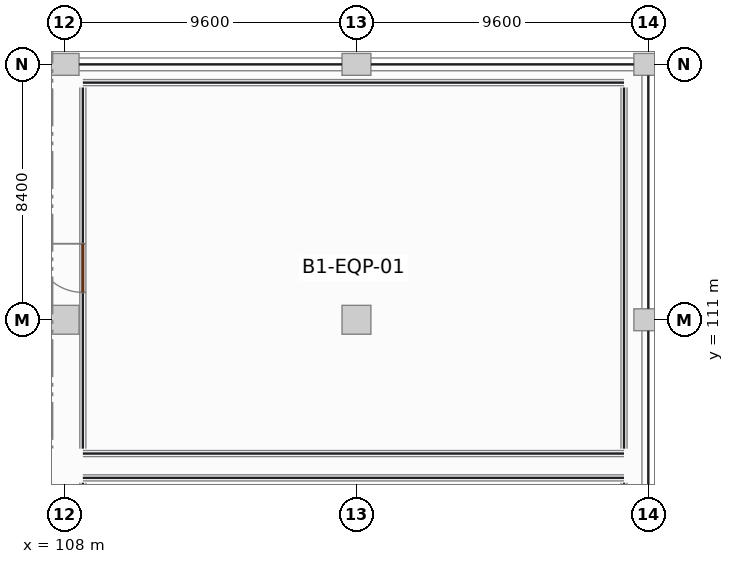
"""IFC4 building model, lengths in metres.
Left out: names, types, materials, properties, quantities, classifications, styles, units other than length and angle.
Written with IfcOpenShell. Run it as: python <this file> out.ifc"""

import sys

from ifc_helpers import new_model, si_unit, direction, frame, frame_2d, origin, origin_2d, place, context, subcontext, project, spatial, rectangle, extrude, element, fill, save


model = new_model("IFC4")
c1 = context("Model", 3, precision=1e-05, world=origin(), true_north=direction((0.0, 1.0)))
c2 = subcontext(c1, "Body", "Model", "MODEL_VIEW")
j1 = project(units=[si_unit("LENGTHUNIT", "METRE"), si_unit("PLANEANGLEUNIT", "RADIAN")], contexts=[c1])
p1 = place(None, origin())
s1 = spatial("IfcSite", under=j1, at=p1, CompositionType="ELEMENT")
p2 = place(p1, origin())
s2 = spatial("IfcBuilding", under=s1, at=p2, CompositionType="ELEMENT")
p3 = place(p2, frame((0.0, 0.0, -4.5)))
s3 = spatial("IfcBuildingStorey", under=s2, at=p3, CompositionType="ELEMENT", Elevation=-4.5)
p4 = place(p3, frame((108.0, 111.0, 0.0), z_axis=(0.0, 0.0, 1.0), x_axis=(1.0, 0.0, 0.0)))
e1 = element("IfcColumn", 1, at=p4, inside=s3, PredefinedType="COLUMN", context=c2, shape_type="SweptSolid", body=[
    extrude(rectangle(XDim=0.95, YDim=0.95, at=origin_2d()), origin(), (0.0, 0.0, 1.0), 4.14),
])
p5 = place(p3, frame((108.0, 119.4, 0.0), z_axis=(0.0, 0.0, 1.0), x_axis=(1.0, 0.0, 0.0)))
e2 = element("IfcColumn", 2, at=p5, inside=s3, PredefinedType="COLUMN", context=c2, shape_type="SweptSolid", body=[
    extrude(rectangle(XDim=0.95, YDim=0.72, at=origin_2d()), origin(), (0.0, 0.0, 1.0), 4.14),
])
p6 = place(p3, frame((117.6, 111.0, 0.0), z_axis=(0.0, 0.0, 1.0), x_axis=(1.0, 0.0, 0.0)))
e3 = element("IfcColumn", 3, at=p6, inside=s3, PredefinedType="COLUMN", context=c2, shape_type="SweptSolid", body=[
    extrude(rectangle(XDim=0.95, YDim=0.95, at=origin_2d()), origin(), (0.0, 0.0, 1.0), 4.14),
])
p7 = place(p3, frame((117.6, 119.4, 0.0), z_axis=(0.0, 0.0, 1.0), x_axis=(1.0, 0.0, 0.0)))
e4 = element("IfcColumn", 4, at=p7, inside=s3, PredefinedType="COLUMN", context=c2, shape_type="SweptSolid", body=[
    extrude(rectangle(XDim=0.95, YDim=0.72, at=origin_2d()), origin(), (0.0, 0.0, 1.0), 4.14),
])
for number, where, z_axis, x_axis in (
    (5, (127.2, 111.0, 0.0), (0.0, 0.0, 1.0), (1.0, 0.0, 0.0)),
    (6, (127.2, 119.4, 0.0), (0.0, 0.0, 1.0), (1.0, 0.0, 0.0)),
):
    element("IfcColumn", number, at=place(p3, frame(where, z_axis=z_axis, x_axis=x_axis)), inside=s3, PredefinedType="COLUMN", context=c2, shape_type="SweptSolid", body=[
        extrude(rectangle(XDim=0.95, YDim=0.72, at=origin_2d()), origin(), (0.0, 0.0, 1.0), 4.28),
    ])
for number, where, z_axis, x_axis in (
    (7, (127.2, 102.962, 0.0), (0.0, 0.0, 1.0), (0.0, 1.0, 0.0)),
    (8, (127.2, 111.362, 0.0), (0.0, 0.0, 1.0), (0.0, 1.0, 0.0)),
):
    element("IfcWall", number, at=place(p3, frame(where, z_axis=z_axis, x_axis=x_axis)), inside=s3, PredefinedType="SOLIDWALL", context=c2, shape_type="SweptSolid", body=[
        extrude(rectangle(XDim=7.676, YDim=0.42, at=frame_2d((3.838, 0.0))), origin(), (0.0, 0.0, 1.0), 4.135),
    ])
for number, where, z_axis, x_axis in (
    (9, (108.477, 119.4, 0.0), (0.0, 0.0, 1.0), (1.0, 0.0, 0.0)),
    (10, (118.077, 119.4, 0.0), (0.0, 0.0, 1.0), (1.0, 0.0, 0.0)),
):
    element("IfcWall", number, at=place(p3, frame(where, z_axis=z_axis, x_axis=x_axis)), inside=s3, PredefinedType="SOLIDWALL", context=c2, shape_type="SweptSolid", body=[
        extrude(rectangle(XDim=8.646, YDim=0.42, at=frame_2d((4.323, 0.0))), origin(), (0.0, 0.0, 1.0), 4.135),
    ])
p8 = place(p3, frame((108.6, 105.8, 0.0), z_axis=(0.0, 0.0, 1.0), x_axis=(1.0, 0.0, 0.0)))
e11 = element("IfcWall", 11, at=p8, inside=s3, PredefinedType="PARTITIONING", context=c2, shape_type="SweptSolid", body=[
    extrude(rectangle(XDim=17.8, YDim=0.2, at=frame_2d((8.9, 0.0))), origin(), (0.0, 0.0, 1.0), 3.22),
])
p9 = place(p3, frame((108.6, 94.56, 0.0), z_axis=(0.0, 0.0, 1.0), x_axis=(0.0, 1.0, 0.0)))
e12 = element("IfcWall", 12, at=p9, inside=s3, PredefinedType="PARTITIONING", context=c2, shape_type="SweptSolid", body=[
    extrude(rectangle(XDim=11.08, YDim=0.2, at=frame_2d((5.54, 0.0))), origin(), (0.0, 0.0, 1.0), 3.22),
])
p10 = place(p9, frame((4.99, 0.0, 0.0)))
e13 = element("IfcOpeningElement", 13, at=p10, cuts=e12, PredefinedType="OPENING", context=c2, shape_type="SweptSolid", body=[
    extrude(rectangle(XDim=1.1, YDim=2.2, at=frame_2d((0.55, 1.1))), frame((0.0, 0.11, 0.0), z_axis=(0.0, -1.0, 0.0), x_axis=(1.0, 0.0, 0.0)), (0.0, 0.0, 1.0), 0.22),
])
p11 = place(p3, frame((126.4, 94.56, 0.0), z_axis=(0.0, 0.0, 1.0), x_axis=(0.0, 1.0, 0.0)))
e14 = element("IfcWall", 14, at=p11, inside=s3, PredefinedType="PARTITIONING", context=c2, shape_type="SweptSolid", body=[
    extrude(rectangle(XDim=11.08, YDim=0.2, at=frame_2d((5.54, 0.0))), origin(), (0.0, 0.0, 1.0), 3.22),
])
for number, where, z_axis, x_axis in (
    (15, (108.6, 106.6, 0.0), (0.0, 0.0, 1.0), (1.0, 0.0, 0.0)),
    (16, (108.6, 118.8, 0.0), (0.0, 0.0, 1.0), (1.0, 0.0, 0.0)),
):
    element("IfcWall", number, at=place(p3, frame(where, z_axis=z_axis, x_axis=x_axis)), inside=s3, PredefinedType="PARTITIONING", context=c2, shape_type="SweptSolid", body=[
        extrude(rectangle(XDim=17.8, YDim=0.2, at=frame_2d((8.9, 0.0))), origin(), (0.0, 0.0, 1.0), 3.22),
    ])
p12 = place(p3, frame((108.6, 106.76, 0.0), z_axis=(0.0, 0.0, 1.0), x_axis=(0.0, 1.0, 0.0)))
e17 = element("IfcWall", 17, at=p12, inside=s3, PredefinedType="PARTITIONING", context=c2, shape_type="SweptSolid", body=[
    extrude(rectangle(XDim=11.88, YDim=0.2, at=frame_2d((5.94, 0.0))), origin(), (0.0, 0.0, 1.0), 3.22),
])
p13 = place(p12, frame((5.14, 0.0, 0.0)))
e18 = element("IfcOpeningElement", 18, at=p13, cuts=e17, PredefinedType="OPENING", context=c2, shape_type="SweptSolid", body=[
    extrude(rectangle(XDim=1.6, YDim=2.3, at=frame_2d((0.8, 1.15))), frame((0.0, 0.11, 0.0), z_axis=(0.0, -1.0, 0.0), x_axis=(1.0, 0.0, 0.0)), (0.0, 0.0, 1.0), 0.22),
])
p14 = place(p3, frame((126.4, 106.76, 0.0), z_axis=(0.0, 0.0, 1.0), x_axis=(0.0, 1.0, 0.0)))
e19 = element("IfcWall", 19, at=p14, inside=s3, PredefinedType="PARTITIONING", context=c2, shape_type="SweptSolid", body=[
    extrude(rectangle(XDim=11.88, YDim=0.2, at=frame_2d((5.94, 0.0))), origin(), (0.0, 0.0, 1.0), 3.22),
])
p15 = place(p13, origin())
e20 = element("IfcDoor", 20, at=p15, inside=s3, OperationType="SINGLE_SWING_RIGHT", PredefinedType="DOOR", context=c2, shape_type="SweptSolid", body=[
    extrude(rectangle(XDim=1.6, YDim=2.3, at=frame_2d((0.8, 1.15))), frame((0.0, 0.025, 0.0), z_axis=(0.0, -1.0, 0.0), x_axis=(1.0, 0.0, 0.0)), (0.0, 0.0, 1.0), 0.05),
])
fill(e18, e20)
save(model, sys.argv[1])
